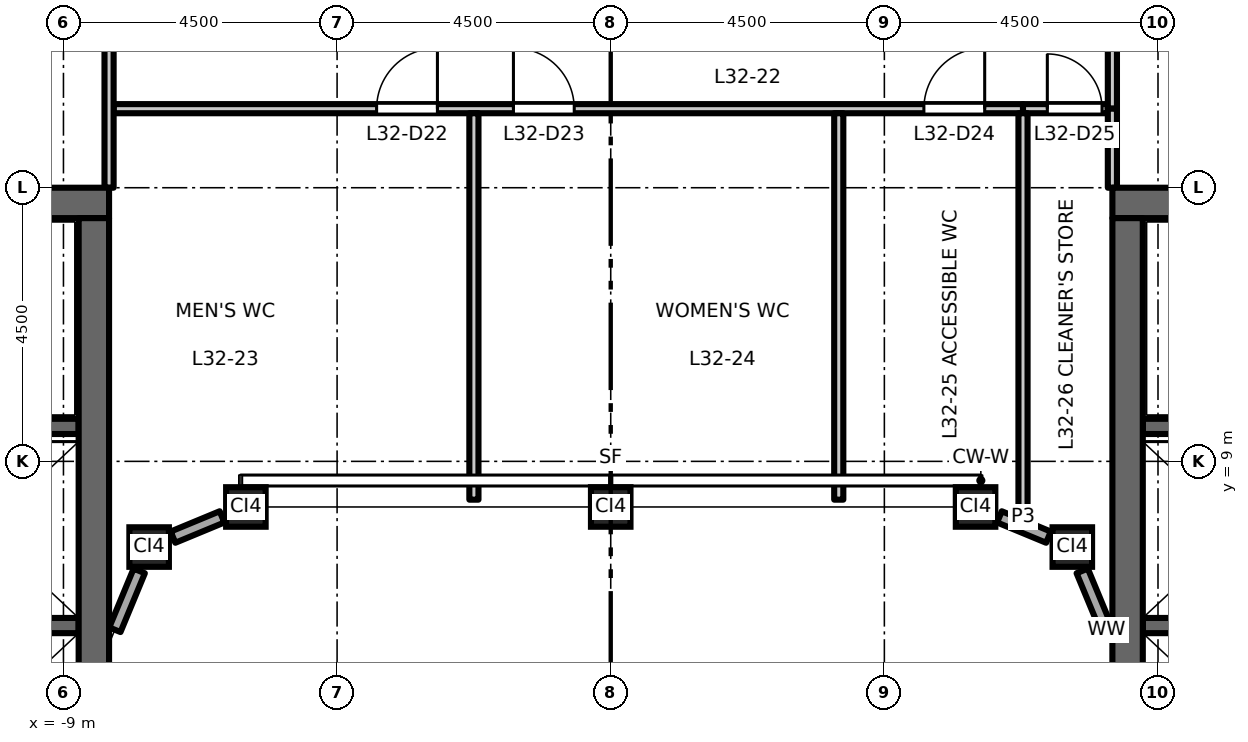
"""IFC4 building model, lengths in metres.
Left out: names, types, materials, properties, quantities, classifications, styles, units other than length and angle.
Written with IfcOpenShell. Run it as: python <this file> out.ifc"""

import sys

from ifc_helpers import new_model, si_unit, direction, frame, frame_2d, origin, origin_2d, place, context, subcontext, project, spatial, rectangle, hollow_rectangle, extrude, element, fill, save


model = new_model("IFC4")
c1 = context("Model", 3, precision=1e-05, world=origin(), true_north=direction((0.0, 1.0)))
c2 = subcontext(c1, "Body", "Model", "MODEL_VIEW")
j1 = project(units=[si_unit("LENGTHUNIT", "METRE"), si_unit("PLANEANGLEUNIT", "RADIAN")], contexts=[c1])
p1 = place(None, origin())
s1 = spatial("IfcSite", under=j1, at=p1, CompositionType="ELEMENT")
p2 = place(p1, origin())
s2 = spatial("IfcBuilding", under=s1, at=p2, CompositionType="ELEMENT")
p3 = place(p2, frame((0.0, 0.0, 149.7)))
s3 = spatial("IfcBuildingStorey", under=s2, at=p3, CompositionType="ELEMENT", Elevation=149.7)
for number, where, z_axis, x_axis in (
    (1, (-7.591, 7.591, 0.0), (0.0, 0.0, 1.0), (1.0, 0.0, 0.0)),
    (2, (-6.0, 8.25, 0.0), (0.0, 0.0, 1.0), (1.0, 0.0, 0.0)),
    (3, (0.0, 8.25, 0.0), (0.0, 0.0, 1.0), (1.0, 0.0, 0.0)),
    (4, (6.0, 8.25, 0.0), (0.0, 0.0, 1.0), (1.0, 0.0, 0.0)),
    (5, (7.591, 7.591, 0.0), (0.0, 0.0, 1.0), (1.0, 0.0, 0.0)),
):
    element("IfcColumn", number, at=place(p3, frame(where, z_axis=z_axis, x_axis=x_axis)), inside=s3, PredefinedType="COLUMN", context=c2, shape_type="SweptSolid", body=[
        extrude(hollow_rectangle(XDim=0.65, YDim=0.65, WallThickness=0.036, at=origin_2d()), origin(), (0.0, 0.0, 1.0), 4.5),
    ])
p4 = place(p3, frame((-8.75, 6.3, 0.0), z_axis=(0.0, 0.0, 1.0), x_axis=(-1.0, 0.0, 0.0)))
e6 = element("IfcWall", 6, at=p4, inside=s3, PredefinedType="SHEAR", context=c2, shape_type="SweptSolid", body=[
    extrude(rectangle(XDim=3.1, YDim=0.25, at=frame_2d((1.55, 0.0))), origin(), (0.0, 0.0, 1.0), 4.35),
])
p5 = place(p3, frame((-8.75, 9.575, 0.0), z_axis=(0.0, 0.0, 1.0), x_axis=(-1.0, 0.0, 0.0)))
e7 = element("IfcWall", 7, at=p5, inside=s3, PredefinedType="SHEAR", context=c2, shape_type="SweptSolid", body=[
    extrude(rectangle(XDim=8.0, YDim=0.25, at=frame_2d((4.0, 0.0))), origin(), (0.0, 0.0, 1.0), 4.35),
])
p6 = place(p5, frame((6.65, 0.0, 0.0)))
e8 = element("IfcOpeningElement", 8, at=p6, cuts=e7, PredefinedType="OPENING", context=c2, shape_type="SweptSolid", body=[
    extrude(rectangle(XDim=1.1, YDim=2.1, at=frame_2d((0.55, 1.05))), frame((0.0, 0.135, 0.0), z_axis=(0.0, -1.0, 0.0), x_axis=(1.0, 0.0, 0.0)), (0.0, 0.0, 1.0), 0.27),
])
p7 = place(p3, frame((-8.25, 13.25, 0.0), z_axis=(0.0, 0.0, 1.0), x_axis=(-1.0, 0.0, 0.0)))
e9 = element("IfcWall", 9, at=p7, inside=s3, PredefinedType="SHEAR", context=c2, shape_type="SweptSolid", body=[
    extrude(rectangle(XDim=13.5, YDim=0.5, at=frame_2d((6.75, 0.0))), origin(), (0.0, 0.0, 1.0), 4.35),
])
p8 = place(p3, frame((-8.5, -13.0, 0.0), z_axis=(0.0, 0.0, 1.0), x_axis=(0.0, 1.0, 0.0)))
e10 = element("IfcWall", 10, at=p8, inside=s3, PredefinedType="SHEAR", context=c2, shape_type="SweptSolid", body=[
    extrude(rectangle(XDim=26.0, YDim=0.5, at=frame_2d((13.0, 0.0))), origin(), (0.0, 0.0, 1.0), 4.35),
])
p9 = place(p3, frame((8.75, 6.3, 0.0), z_axis=(0.0, 0.0, 1.0), x_axis=(1.0, 0.0, 0.0)))
e11 = element("IfcWall", 11, at=p9, inside=s3, PredefinedType="SHEAR", context=c2, shape_type="SweptSolid", body=[
    extrude(rectangle(XDim=3.1, YDim=0.25, at=frame_2d((1.55, 0.0))), origin(), (0.0, 0.0, 1.0), 4.35),
])
p10 = place(p3, frame((8.75, 9.575, 0.0), z_axis=(0.0, 0.0, 1.0), x_axis=(1.0, 0.0, 0.0)))
e12 = element("IfcWall", 12, at=p10, inside=s3, PredefinedType="SHEAR", context=c2, shape_type="SweptSolid", body=[
    extrude(rectangle(XDim=8.0, YDim=0.25, at=frame_2d((4.0, 0.0))), origin(), (0.0, 0.0, 1.0), 4.35),
])
p11 = place(p10, frame((6.65, 0.0, 0.0)))
e13 = element("IfcOpeningElement", 13, at=p11, cuts=e12, PredefinedType="OPENING", context=c2, shape_type="SweptSolid", body=[
    extrude(rectangle(XDim=1.1, YDim=2.1, at=frame_2d((0.55, 1.05))), frame((0.0, 0.135, 0.0), z_axis=(0.0, -1.0, 0.0), x_axis=(1.0, 0.0, 0.0)), (0.0, 0.0, 1.0), 0.27),
])
p12 = place(p3, frame((8.25, 13.25, 0.0), z_axis=(0.0, 0.0, 1.0), x_axis=(1.0, 0.0, 0.0)))
e14 = element("IfcWall", 14, at=p12, inside=s3, PredefinedType="SHEAR", context=c2, shape_type="SweptSolid", body=[
    extrude(rectangle(XDim=13.5, YDim=0.5, at=frame_2d((6.75, 0.0))), origin(), (0.0, 0.0, 1.0), 4.35),
])
p13 = place(p3, frame((8.5, -13.0, 0.0), z_axis=(0.0, 0.0, 1.0), x_axis=(0.0, 1.0, 0.0)))
e15 = element("IfcWall", 15, at=p13, inside=s3, PredefinedType="SHEAR", context=c2, shape_type="SweptSolid", body=[
    extrude(rectangle(XDim=26.0, YDim=0.5, at=frame_2d((13.0, 0.0))), origin(), (0.0, 0.0, 1.0), 4.35),
])
p14 = place(p3, frame((8.154, 6.231, 0.0), z_axis=(0.0, 0.0, 1.0), x_axis=(-0.382694858887, 0.923874799408, 0.0)))
e16 = element("IfcWall", 16, at=p14, inside=s3, PredefinedType="STANDARD", context=c2, shape_type="SweptSolid", body=[
    extrude(rectangle(XDim=1.048, YDim=0.2, at=frame_2d((0.524, 0.0))), origin(), (0.0, 0.0, 1.0), 3.826),
])
for number, where, z_axis, x_axis in (
    (17, (7.199, 7.753, 0.0), (0.0, 0.0, 1.0), (-0.924, 0.383, 0.0)),
    (18, (-6.392, 8.087, 0.0), (0.0, 0.0, 1.0), (-0.924, -0.383, 0.0)),
):
    element("IfcWall", number, at=place(p3, frame(where, z_axis=z_axis, x_axis=x_axis)), inside=s3, PredefinedType="STANDARD", context=c2, shape_type="SweptSolid", body=[
        extrude(rectangle(XDim=0.873, YDim=0.2, at=frame_2d((0.437, 0.0))), origin(), (0.0, 0.0, 1.0), 3.826),
    ])
p15 = place(p3, frame((-7.753, 7.199, 0.0), z_axis=(0.0, 0.0, 1.0), x_axis=(-0.382694858887, -0.923874799408, 0.0)))
e19 = element("IfcWall", 19, at=p15, inside=s3, PredefinedType="STANDARD", context=c2, shape_type="SweptSolid", body=[
    extrude(rectangle(XDim=1.048, YDim=0.2, at=frame_2d((0.524, 0.0))), origin(), (0.0, 0.0, 1.0), 3.826),
])
p16 = place(p3, frame((-8.175, 14.8, 0.0), z_axis=(0.0, 0.0, 1.0), x_axis=(1.0, 0.0, 0.0)))
e20 = element("IfcWall", 20, at=p16, inside=s3, PredefinedType="PARTITIONING", context=c2, shape_type="SweptSolid", body=[
    extrude(rectangle(XDim=14.955, YDim=0.15, at=frame_2d((7.478, 0.0))), origin(), (0.0, 0.0, 1.0), 4.35),
])
p17 = place(p16, frame((4.325, 0.0, 0.0)))
e21 = element("IfcOpeningElement", 21, at=p17, cuts=e20, PredefinedType="OPENING", context=c2, shape_type="SweptSolid", body=[
    extrude(rectangle(XDim=1.0, YDim=2.1, at=frame_2d((0.5, 1.05))), frame((0.0, 0.085, 0.0), z_axis=(0.0, -1.0, 0.0), x_axis=(1.0, 0.0, 0.0)), (0.0, 0.0, 1.0), 0.17),
])
p18 = place(p16, frame((6.575, 0.0, 0.0)))
e22 = element("IfcOpeningElement", 22, at=p18, cuts=e20, PredefinedType="OPENING", context=c2, shape_type="SweptSolid", body=[
    extrude(rectangle(XDim=1.0, YDim=2.1, at=frame_2d((0.5, 1.05))), frame((0.0, 0.085, 0.0), z_axis=(0.0, -1.0, 0.0), x_axis=(1.0, 0.0, 0.0)), (0.0, 0.0, 1.0), 0.17),
])
p19 = place(p16, frame((13.325, 0.0, 0.0)))
e23 = element("IfcOpeningElement", 23, at=p19, cuts=e20, PredefinedType="OPENING", context=c2, shape_type="SweptSolid", body=[
    extrude(rectangle(XDim=1.0, YDim=2.1, at=frame_2d((0.5, 1.05))), frame((0.0, 0.085, 0.0), z_axis=(0.0, -1.0, 0.0), x_axis=(1.0, 0.0, 0.0)), (0.0, 0.0, 1.0), 0.17),
])
p20 = place(p3, frame((6.78, 14.8, 0.0), z_axis=(0.0, 0.0, 1.0), x_axis=(1.0, 0.0, 0.0)))
e24 = element("IfcWall", 24, at=p20, inside=s3, PredefinedType="PARTITIONING", context=c2, shape_type="SweptSolid", body=[
    extrude(rectangle(XDim=1.395, YDim=0.15, at=frame_2d((0.698, 0.0))), origin(), (0.0, 0.0, 1.0), 4.35),
])
p21 = place(p20, frame((0.4, 0.0, 0.0)))
e25 = element("IfcOpeningElement", 25, at=p21, cuts=e24, PredefinedType="OPENING", context=c2, shape_type="SweptSolid", body=[
    extrude(rectangle(XDim=0.9, YDim=2.1, at=frame_2d((0.45, 1.05))), frame((0.0, 0.085, 0.0), z_axis=(0.0, -1.0, 0.0), x_axis=(1.0, 0.0, 0.0)), (0.0, 0.0, 1.0), 0.17),
])
p22 = place(p3, frame((-8.25, 13.5, 0.0), z_axis=(0.0, 0.0, 1.0), x_axis=(0.0, 1.0, 0.0)))
e26 = element("IfcWall", 26, at=p22, inside=s3, PredefinedType="PARTITIONING", context=c2, shape_type="SweptSolid", body=[
    extrude(rectangle(XDim=3.425, YDim=0.15, at=frame_2d((1.712, 0.0))), origin(), (0.0, 0.0, 1.0), 4.35),
])
for number, where, z_axis, x_axis in (
    (27, (-2.25, 8.37, 0.0), (0.0, 0.0, 1.0), (0.0, 1.0, 0.0)),
    (28, (3.75, 8.37, 0.0), (0.0, 0.0, 1.0), (0.0, 1.0, 0.0)),
):
    element("IfcWall", number, at=place(p3, frame(where, z_axis=z_axis, x_axis=x_axis)), inside=s3, PredefinedType="PARTITIONING", context=c2, shape_type="SweptSolid", body=[
        extrude(rectangle(XDim=6.355, YDim=0.15, at=frame_2d((3.177, 0.0))), origin(), (0.0, 0.0, 1.0), 4.35),
    ])
p23 = place(p3, frame((6.78, 8.087, 0.0), z_axis=(0.0, 0.0, 1.0), x_axis=(0.0, 1.0, 0.0)))
e29 = element("IfcWall", 29, at=p23, inside=s3, PredefinedType="PARTITIONING", context=c2, shape_type="SweptSolid", body=[
    extrude(rectangle(XDim=6.638, YDim=0.15, at=frame_2d((3.319, 0.0))), origin(), (0.0, 0.0, 1.0), 4.35),
])
p24 = place(p3, frame((8.25, 14.8, 0.0), z_axis=(0.0, 0.0, 1.0), x_axis=(0.0, 1.0, 0.0)))
e30 = element("IfcWall", 30, at=p24, inside=s3, PredefinedType="PARTITIONING", context=c2, shape_type="SweptSolid", body=[
    extrude(rectangle(XDim=2.125, YDim=0.15, at=frame_2d((1.062, 0.0))), origin(), (0.0, 0.0, 1.0), 4.35),
])
p25 = place(p3, frame((8.25, 13.5, 0.0), z_axis=(0.0, 0.0, 1.0), x_axis=(0.0, 1.0, 0.0)))
e31 = element("IfcWall", 31, at=p25, inside=s3, PredefinedType="PARTITIONING", context=c2, shape_type="SweptSolid", body=[
    extrude(rectangle(XDim=1.3, YDim=0.15, at=frame_2d((0.65, 0.0))), origin(), (0.0, 0.0, 1.0), 4.35),
])
p26 = place(p17, origin())
e32 = element("IfcDoor", 32, at=p26, inside=s3, OperationType="SINGLE_SWING_RIGHT", PredefinedType="DOOR", context=c2, shape_type="SweptSolid", body=[
    extrude(rectangle(XDim=1.0, YDim=2.1, at=frame_2d((0.5, 1.05))), frame((0.0, 0.025, 0.0), z_axis=(0.0, -1.0, 0.0), x_axis=(1.0, 0.0, 0.0)), (0.0, 0.0, 1.0), 0.05),
])
fill(e21, e32)
p27 = place(p18, origin())
e33 = element("IfcDoor", 33, at=p27, inside=s3, OperationType="SINGLE_SWING_LEFT", PredefinedType="DOOR", context=c2, shape_type="SweptSolid", body=[
    extrude(rectangle(XDim=1.0, YDim=2.1, at=frame_2d((0.5, 1.05))), frame((0.0, 0.025, 0.0), z_axis=(0.0, -1.0, 0.0), x_axis=(1.0, 0.0, 0.0)), (0.0, 0.0, 1.0), 0.05),
])
fill(e22, e33)
p28 = place(p19, origin())
e34 = element("IfcDoor", 34, at=p28, inside=s3, OperationType="SINGLE_SWING_RIGHT", PredefinedType="DOOR", context=c2, shape_type="SweptSolid", body=[
    extrude(rectangle(XDim=1.0, YDim=2.1, at=frame_2d((0.5, 1.05))), frame((0.0, 0.025, 0.0), z_axis=(0.0, -1.0, 0.0), x_axis=(1.0, 0.0, 0.0)), (0.0, 0.0, 1.0), 0.05),
])
fill(e23, e34)
p29 = place(p21, origin())
e35 = element("IfcDoor", 35, at=p29, inside=s3, OperationType="SINGLE_SWING_LEFT", PredefinedType="DOOR", context=c2, shape_type="SweptSolid", body=[
    extrude(rectangle(XDim=0.9, YDim=2.1, at=frame_2d((0.45, 1.05))), frame((0.0, 0.025, 0.0), z_axis=(0.0, -1.0, 0.0), x_axis=(1.0, 0.0, 0.0)), (0.0, 0.0, 1.0), 0.05),
])
fill(e25, e35)
save(model, sys.argv[1])
